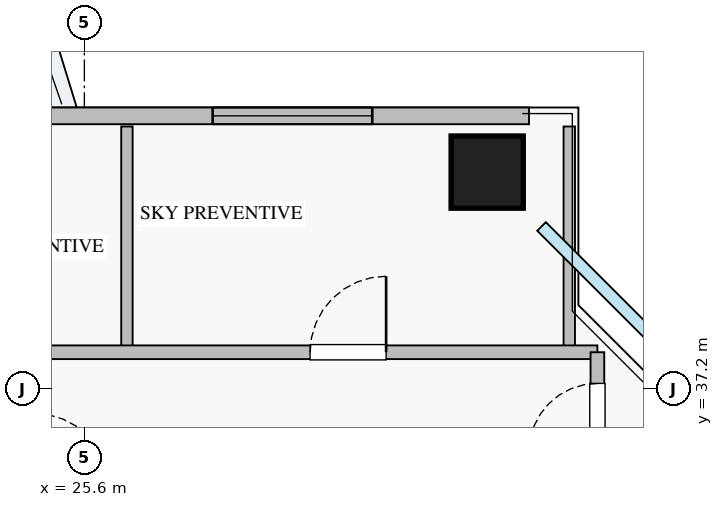
"""IFC4 building model, lengths in metres.
Left out: names, types, materials, properties, quantities, classifications, styles, units other than length and angle.
Written with IfcOpenShell. Run it as: python <this file> out.ifc"""

import sys

from ifc_helpers import new_model, si_unit, direction, frame, frame_2d, origin, origin_2d, place, context, subcontext, project, spatial, rectangle, extrude, source, transform, mapped, element, fill, save


model = new_model("IFC4")
c1 = context("Model", 3, precision=1e-05, world=origin(), true_north=direction((0.0, 1.0)))
c2 = subcontext(c1, "Body", "Model", "MODEL_VIEW")
j1 = project(units=[si_unit("LENGTHUNIT", "METRE"), si_unit("PLANEANGLEUNIT", "RADIAN")], contexts=[c1])
p1 = place(None, origin())
s1 = spatial("IfcSite", under=j1, at=p1, CompositionType="ELEMENT")
p2 = place(p1, origin())
s2 = spatial("IfcBuilding", under=s1, at=p2, CompositionType="ELEMENT")
p3 = place(p2, frame((0.0, 0.0, 179.5)))
s3 = spatial("IfcBuildingStorey", under=s2, at=p3, CompositionType="ELEMENT", Elevation=179.5)
m1 = source(origin(), c2, "Body", "SweptSolid", [
    extrude(rectangle(XDim=0.95, YDim=0.95, at=origin_2d()), origin(), (0.0, 0.0, 1.0), 3.25),
])
p4 = place(p3, frame((30.9, 40.05, 0.0), z_axis=(0.0, 0.0, 1.0), x_axis=(1.0, 0.0, 0.0)))
e1 = element("IfcColumn", 1, at=p4, inside=s3, PredefinedType="COLUMN", context=c2, shape_type="MappedRepresentation", body=[
    mapped(m1, transform((0.0, 0.0, 0.0), x_axis=(1.0, 0.0, 0.0), y_axis=(0.0, 1.0, 0.0), z_axis=(0.0, 0.0, 1.0), scale=1.0)),
])
p5 = place(p3, frame((6.55, 40.79, 0.0), z_axis=(0.0, 0.0, 1.0), x_axis=(1.0, 0.0, 0.0)))
e2 = element("IfcWall", 2, at=p5, inside=s3, PredefinedType="STANDARD", context=c2, shape_type="SweptSolid", body=[
    extrude(rectangle(XDim=24.9, YDim=0.22, at=frame_2d((12.45, 0.0))), origin(), (0.0, 0.0, 1.0), 2.61),
])
p6 = place(p5, frame((13.3, 0.0, 0.0)))
e3 = element("IfcOpeningElement", 3, at=p6, cuts=e2, PredefinedType="OPENING", context=c2, shape_type="SweptSolid", body=[
    extrude(rectangle(XDim=1.2, YDim=2.1, at=frame_2d((0.6, 1.05))), frame((0.0, 0.12, 0.0), z_axis=(0.0, -1.0, 0.0), x_axis=(1.0, 0.0, 0.0)), (0.0, 0.0, 1.0), 0.24),
])
p7 = place(p5, frame((0.343, 0.0, 0.9)))
e4 = element("IfcOpeningElement", 4, at=p7, cuts=e2, PredefinedType="OPENING", context=c2, shape_type="SweptSolid", body=[
    extrude(rectangle(XDim=1.5, YDim=1.5, at=frame_2d((0.75, 0.75))), frame((0.0, 0.12, 0.0), z_axis=(0.0, -1.0, 0.0), x_axis=(1.0, 0.0, 0.0)), (0.0, 0.0, 1.0), 0.24),
])
p8 = place(p5, frame((9.79, 0.0, 0.9)))
e5 = element("IfcOpeningElement", 5, at=p8, cuts=e2, PredefinedType="OPENING", context=c2, shape_type="SweptSolid", body=[
    extrude(rectangle(XDim=1.8, YDim=1.5, at=frame_2d((0.9, 0.75))), frame((0.0, 0.12, 0.0), z_axis=(0.0, -1.0, 0.0), x_axis=(1.0, 0.0, 0.0)), (0.0, 0.0, 1.0), 0.24),
])
p9 = place(p5, frame((14.813, 0.0, 0.9)))
e6 = element("IfcOpeningElement", 6, at=p9, cuts=e2, PredefinedType="OPENING", context=c2, shape_type="SweptSolid", body=[
    extrude(rectangle(XDim=1.5, YDim=1.45, at=frame_2d((0.75, 0.725))), frame((0.0, 0.12, 0.0), z_axis=(0.0, -1.0, 0.0), x_axis=(1.0, 0.0, 0.0)), (0.0, 0.0, 1.0), 0.24),
])
p10 = place(p5, frame((20.738, 0.0, 0.9)))
e7 = element("IfcOpeningElement", 7, at=p10, cuts=e2, PredefinedType="OPENING", context=c2, shape_type="SweptSolid", body=[
    extrude(rectangle(XDim=2.1, YDim=1.48, at=frame_2d((1.05, 0.74))), frame((0.0, 0.12, 0.0), z_axis=(0.0, -1.0, 0.0), x_axis=(1.0, 0.0, 0.0)), (0.0, 0.0, 1.0), 0.24),
])
p11 = place(p5, frame((4.122, 0.0, 0.9)))
e8 = element("IfcOpeningElement", 8, at=p11, cuts=e2, PredefinedType="OPENING", context=c2, shape_type="SweptSolid", body=[
    extrude(rectangle(XDim=2.4, YDim=1.5, at=frame_2d((1.2, 0.75))), frame((0.0, 0.12, 0.0), z_axis=(0.0, -1.0, 0.0), x_axis=(1.0, 0.0, 0.0)), (0.0, 0.0, 1.0), 0.24),
])
p12 = place(p5, frame((6.758, 0.0, 0.9)))
e9 = element("IfcOpeningElement", 9, at=p12, cuts=e2, PredefinedType="OPENING", context=c2, shape_type="SweptSolid", body=[
    extrude(rectangle(XDim=1.8, YDim=1.5, at=frame_2d((0.9, 0.75))), frame((0.0, 0.12, 0.0), z_axis=(0.0, -1.0, 0.0), x_axis=(1.0, 0.0, 0.0)), (0.0, 0.0, 1.0), 0.24),
])
for number, where, z_axis, x_axis in (
    (10, (26.16, 37.68, 0.0), (0.0, 0.0, 1.0), (0.0, 1.0, 0.0)),
    (11, (31.98, 37.68, 0.0), (0.0, 0.0, 1.0), (0.0, 1.0, 0.0)),
):
    element("IfcWall", number, at=place(p3, frame(where, z_axis=z_axis, x_axis=x_axis)), inside=s3, PredefinedType="PARTITIONING", context=c2, shape_type="SweptSolid", body=[
        extrude(rectangle(XDim=2.97, YDim=0.15, at=frame_2d((1.485, 0.0))), origin(), (0.0, 0.0, 1.0), 3.07),
    ])
p13 = place(p3, frame((8.72, 37.68, 0.0), z_axis=(0.0, 0.0, 1.0), x_axis=(1.0, 0.0, 0.0)))
e12 = element("IfcWall", 12, at=p13, inside=s3, PredefinedType="PARTITIONING", context=c2, shape_type="SweptSolid", body=[
    extrude(rectangle(XDim=23.63, YDim=0.18, at=frame_2d((11.815, 0.0))), origin(), (0.0, 0.0, 1.0), 3.07),
])
p14 = place(p13, frame((2.83, 0.0, 0.0)))
e13 = element("IfcOpeningElement", 13, at=p14, cuts=e12, PredefinedType="OPENING", context=c2, shape_type="SweptSolid", body=[
    extrude(rectangle(XDim=1.0, YDim=2.05, at=frame_2d((0.5, 1.025))), frame((0.0, 0.1, 0.0), z_axis=(0.0, -1.0, 0.0), x_axis=(1.0, 0.0, 0.0)), (0.0, 0.0, 1.0), 0.2),
])
p15 = place(p13, frame((8.02, 0.0, 0.0)))
e14 = element("IfcOpeningElement", 14, at=p15, cuts=e12, PredefinedType="OPENING", context=c2, shape_type="SweptSolid", body=[
    extrude(rectangle(XDim=1.0, YDim=2.05, at=frame_2d((0.5, 1.025))), frame((0.0, 0.1, 0.0), z_axis=(0.0, -1.0, 0.0), x_axis=(1.0, 0.0, 0.0)), (0.0, 0.0, 1.0), 0.2),
])
p16 = place(p13, frame((13.41, 0.0, 0.0)))
e15 = element("IfcOpeningElement", 15, at=p16, cuts=e12, PredefinedType="OPENING", context=c2, shape_type="SweptSolid", body=[
    extrude(rectangle(XDim=1.0, YDim=2.05, at=frame_2d((0.5, 1.025))), frame((0.0, 0.1, 0.0), z_axis=(0.0, -1.0, 0.0), x_axis=(1.0, 0.0, 0.0)), (0.0, 0.0, 1.0), 0.2),
])
p17 = place(p13, frame((19.85, 0.0, 0.0)))
e16 = element("IfcOpeningElement", 16, at=p17, cuts=e12, PredefinedType="OPENING", context=c2, shape_type="SweptSolid", body=[
    extrude(rectangle(XDim=1.0, YDim=2.05, at=frame_2d((0.5, 1.025))), frame((0.0, 0.1, 0.0), z_axis=(0.0, -1.0, 0.0), x_axis=(1.0, 0.0, 0.0)), (0.0, 0.0, 1.0), 0.2),
])
p18 = place(p3, frame((32.35, 8.31, 0.0), z_axis=(0.0, 0.0, 1.0), x_axis=(0.0, 1.0, 0.0)))
e17 = element("IfcWall", 17, at=p18, inside=s3, PredefinedType="PARTITIONING", context=c2, shape_type="SweptSolid", body=[
    extrude(rectangle(XDim=29.37, YDim=0.18, at=frame_2d((14.685, 0.0))), origin(), (0.0, 0.0, 1.0), 3.07),
])
p19 = place(p18, frame((28.06, 0.0, 0.0)))
e18 = element("IfcOpeningElement", 18, at=p19, cuts=e17, PredefinedType="OPENING", context=c2, shape_type="SweptSolid", body=[
    extrude(rectangle(XDim=0.9, YDim=2.05, at=frame_2d((0.45, 1.025))), frame((0.0, 0.1, 0.0), z_axis=(0.0, -1.0, 0.0), x_axis=(1.0, 0.0, 0.0)), (0.0, 0.0, 1.0), 0.2),
])
p20 = place(p18, frame((0.415, 0.0, 0.0)))
e19 = element("IfcOpeningElement", 19, at=p20, cuts=e17, PredefinedType="OPENING", context=c2, shape_type="SweptSolid", body=[
    extrude(rectangle(XDim=0.9, YDim=2.05, at=frame_2d((0.45, 1.025))), frame((0.0, 0.1, 0.0), z_axis=(0.0, -1.0, 0.0), x_axis=(1.0, 0.0, 0.0)), (0.0, 0.0, 1.0), 0.2),
])
p21 = place(p18, frame((3.58, 0.0, 0.0)))
e20 = element("IfcOpeningElement", 20, at=p21, cuts=e17, PredefinedType="OPENING", context=c2, shape_type="SweptSolid", body=[
    extrude(rectangle(XDim=1.0, YDim=2.05, at=frame_2d((0.5, 1.025))), frame((0.0, 0.1, 0.0), z_axis=(0.0, -1.0, 0.0), x_axis=(1.0, 0.0, 0.0)), (0.0, 0.0, 1.0), 0.2),
])
p22 = place(p18, frame((12.305, 0.0, 0.0)))
e21 = element("IfcOpeningElement", 21, at=p22, cuts=e17, PredefinedType="OPENING", context=c2, shape_type="SweptSolid", body=[
    extrude(rectangle(XDim=1.0, YDim=2.05, at=frame_2d((0.5, 1.025))), frame((0.0, 0.1, 0.0), z_axis=(0.0, -1.0, 0.0), x_axis=(1.0, 0.0, 0.0)), (0.0, 0.0, 1.0), 0.2),
])
p23 = place(p18, frame((20.835, 0.0, 0.0)))
e22 = element("IfcOpeningElement", 22, at=p23, cuts=e17, PredefinedType="OPENING", context=c2, shape_type="SweptSolid", body=[
    extrude(rectangle(XDim=1.0, YDim=2.05, at=frame_2d((0.5, 1.025))), frame((0.0, 0.1, 0.0), z_axis=(0.0, -1.0, 0.0), x_axis=(1.0, 0.0, 0.0)), (0.0, 0.0, 1.0), 0.2),
])
m2 = source(origin(), c2, "Body", "SweptSolid", [
    extrude(rectangle(XDim=2.1, YDim=1.48, at=frame_2d((1.05, 0.74))), frame((0.0, 0.03, 0.0), z_axis=(0.0, -1.0, 0.0), x_axis=(1.0, 0.0, 0.0)), (0.0, 0.0, 1.0), 0.06),
])
p24 = place(p10, origin())
e23 = element("IfcWindow", 23, at=p24, inside=s3, PartitioningType="TRIPLE_PANEL_VERTICAL", PredefinedType="WINDOW", context=c2, shape_type="MappedRepresentation", body=[
    mapped(m2, transform((0.0, 0.0, 0.0), x_axis=(1.0, 0.0, 0.0), y_axis=(0.0, 1.0, 0.0), z_axis=(0.0, 0.0, 1.0), scale=1.0)),
])
fill(e7, e23)
m3 = source(origin(), c2, "Body", "SweptSolid", [
    extrude(rectangle(XDim=1.0, YDim=2.05, at=frame_2d((0.5, 1.025))), frame((0.0, 0.025, 0.0), z_axis=(0.0, -1.0, 0.0), x_axis=(1.0, 0.0, 0.0)), (0.0, 0.0, 1.0), 0.05),
])
p25 = place(p17, origin())
e24 = element("IfcDoor", 24, at=p25, inside=s3, OperationType="SINGLE_SWING_RIGHT", PredefinedType="DOOR", context=c2, shape_type="MappedRepresentation", body=[
    mapped(m3, transform((0.0, 0.0, 0.0), x_axis=(1.0, 0.0, 0.0), y_axis=(0.0, 1.0, 0.0), z_axis=(0.0, 0.0, 1.0), scale=1.0)),
])
fill(e16, e24)
m4 = source(origin(), c2, "Body", "SweptSolid", [
    extrude(rectangle(XDim=0.9, YDim=2.05, at=frame_2d((0.45, 1.025))), frame((0.0, 0.025, 0.0), z_axis=(0.0, -1.0, 0.0), x_axis=(1.0, 0.0, 0.0)), (0.0, 0.0, 1.0), 0.05),
])
p26 = place(p19, origin())
e25 = element("IfcDoor", 25, at=p26, inside=s3, OperationType="SINGLE_SWING_LEFT", PredefinedType="DOOR", context=c2, shape_type="MappedRepresentation", body=[
    mapped(m4, transform((0.0, 0.0, 0.0), x_axis=(1.0, 0.0, 0.0), y_axis=(0.0, 1.0, 0.0), z_axis=(0.0, 0.0, 1.0), scale=1.0)),
])
fill(e18, e25)
save(model, sys.argv[1])
